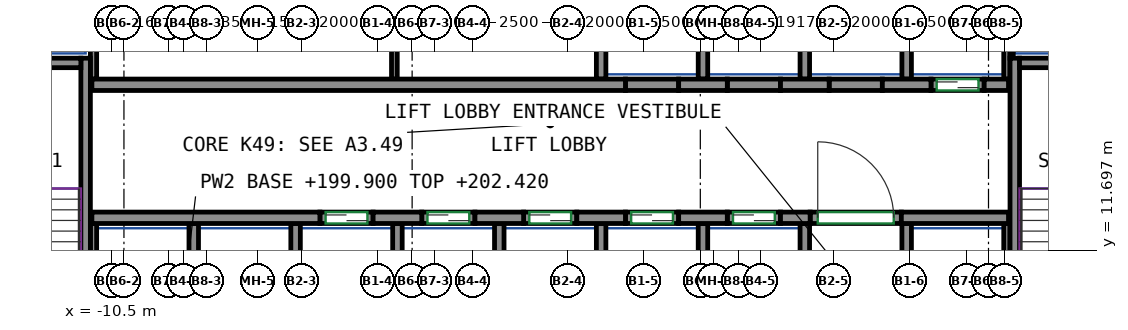
"""IFC4 building model, lengths in metres.
Left out: names, types, materials, properties, quantities, classifications, styles, units other than length and angle.
Written with IfcOpenShell. Run it as: python <this file> out.ifc"""

import sys

from ifc_helpers import new_model, si_unit, direction, frame, frame_2d, origin, place, context, subcontext, project, spatial, rectangle, extrude, source, transform, mapped, element, fill, save


model = new_model("IFC4")
c1 = context("Model", 3, precision=1e-05, world=origin(), true_north=direction((0.0, 1.0)))
c2 = subcontext(c1, "Body", "Model", "MODEL_VIEW")
j1 = project(units=[si_unit("LENGTHUNIT", "METRE"), si_unit("PLANEANGLEUNIT", "RADIAN")], contexts=[c1])
p1 = place(None, origin())
s1 = spatial("IfcSite", under=j1, at=p1, CompositionType="ELEMENT")
p2 = place(p1, origin())
s2 = spatial("IfcBuilding", under=s1, at=p2, CompositionType="ELEMENT")
p3 = place(p2, frame((0.0, 0.0, 199.9)))
s3 = spatial("IfcBuildingStorey", under=s2, at=p3, CompositionType="ELEMENT", Elevation=199.9)
m1 = source(origin(), c2, "Body", "SweptSolid", [
    extrude(rectangle(XDim=7.75, YDim=0.25, at=frame_2d((3.875, 0.0))), origin(), (0.0, 0.0, 1.0), 3.12),
])
p4 = place(p3, frame((-11.175, 9.0, 0.0), z_axis=(0.0, 0.0, 1.0), x_axis=(0.0, 1.0, 0.0)))
e1 = element("IfcWall", 1, at=p4, inside=s3, PredefinedType="SHEAR", context=c2, shape_type="MappedRepresentation", body=[
    mapped(m1, transform((0.0, 0.0, 0.0))),
])
m2 = source(origin(), c2, "Body", "SweptSolid", [
    extrude(rectangle(XDim=3.7, YDim=0.25, at=frame_2d((1.85, 0.0))), origin(), (0.0, 0.0, 1.0), 3.12),
])
p5 = place(p3, frame((-15.0, 16.625, 0.0), z_axis=(0.0, 0.0, 1.0), x_axis=(1.0, 0.0, 0.0)))
e2 = element("IfcWall", 2, at=p5, inside=s3, PredefinedType="SHEAR", context=c2, shape_type="MappedRepresentation", body=[
    mapped(m2, transform((0.0, 0.0, 0.0))),
])
p6 = place(p3, frame((13.275, 9.0, 0.0), z_axis=(0.0, 0.0, 1.0), x_axis=(0.0, 1.0, 0.0)))
e3 = element("IfcWall", 3, at=p6, inside=s3, PredefinedType="SHEAR", context=c2, shape_type="MappedRepresentation", body=[
    mapped(m1, transform((0.0, 0.0, 0.0))),
])
m3 = source(origin(), c2, "Body", "SweptSolid", [
    extrude(rectangle(XDim=3.7, YDim=0.25, at=frame_2d((1.85, 0.0))), origin(), (0.0, 0.0, 1.0), 3.12),
])
p7 = place(p3, frame((13.4, 16.625, 0.0), z_axis=(0.0, 0.0, 1.0), x_axis=(1.0, 0.0, 0.0)))
e4 = element("IfcWall", 4, at=p7, inside=s3, PredefinedType="SHEAR", context=c2, shape_type="MappedRepresentation", body=[
    mapped(m3, transform((0.0, 0.0, 0.0))),
])
m4 = source(origin(), c2, "Body", "SweptSolid", [
    extrude(rectangle(XDim=6.0, YDim=0.3, at=frame_2d((3.0, 0.0))), origin(), (0.0, 0.0, 1.0), 3.12),
])
p8 = place(p3, frame((-11.01, 12.55, 0.0), z_axis=(0.0, 0.0, 1.0), x_axis=(1.0, 0.0, 0.0)))
e5 = element("IfcWall", 5, at=p8, inside=s3, PredefinedType="SHEAR", context=c2, shape_type="MappedRepresentation", body=[
    mapped(m4, transform((0.0, 0.0, 0.0))),
])
m5 = source(origin(), c2, "Body", "SweptSolid", [
    extrude(rectangle(XDim=1.28, YDim=0.3, at=frame_2d((0.64, 0.0))), origin(), (0.0, 0.0, 1.0), 3.12),
])
for number, where, z_axis, x_axis in (
    (6, (-3.61, 12.55, 0.0), (0.0, 0.0, 1.0), (1.0, 0.0, 0.0)),
    (7, (-0.93, 12.55, 0.0), (0.0, 0.0, 1.0), (1.0, 0.0, 0.0)),
    (8, (1.75, 12.55, 0.0), (0.0, 0.0, 1.0), (1.0, 0.0, 0.0)),
    (9, (4.43, 12.55, 0.0), (0.0, 0.0, 1.0), (1.0, 0.0, 0.0)),
):
    element("IfcWall", number, at=place(p3, frame(where, z_axis=z_axis, x_axis=x_axis)), inside=s3, PredefinedType="SHEAR", context=c2, shape_type="MappedRepresentation", body=[
        mapped(m5, transform((0.0, 0.0, 0.0))),
    ])
m6 = source(origin(), c2, "Body", "SweptSolid", [
    extrude(rectangle(XDim=0.78, YDim=0.3, at=frame_2d((0.39, 0.0))), origin(), (0.0, 0.0, 1.0), 3.12),
])
p9 = place(p3, frame((7.11, 12.55, 0.0), z_axis=(0.0, 0.0, 1.0), x_axis=(1.0, 0.0, 0.0)))
e10 = element("IfcWall", 10, at=p9, inside=s3, PredefinedType="SHEAR", context=c2, shape_type="MappedRepresentation", body=[
    mapped(m6, transform((0.0, 0.0, 0.0))),
])
m7 = source(origin(), c2, "Body", "SweptSolid", [
    extrude(rectangle(XDim=2.82, YDim=0.3, at=frame_2d((1.41, 0.0))), origin(), (0.0, 0.0, 1.0), 3.12),
])
p10 = place(p3, frame((10.29, 12.55, 0.0), z_axis=(0.0, 0.0, 1.0), x_axis=(1.0, 0.0, 0.0)))
e11 = element("IfcWall", 11, at=p10, inside=s3, PredefinedType="SHEAR", context=c2, shape_type="MappedRepresentation", body=[
    mapped(m7, transform((0.0, 0.0, 0.0))),
])
m8 = source(origin(), c2, "Body", "SweptSolid", [
    extrude(rectangle(XDim=14.04, YDim=0.3, at=frame_2d((7.02, 0.0))), origin(), (0.0, 0.0, 1.0), 3.12),
])
p11 = place(p3, frame((-11.01, 16.05, 0.0), z_axis=(0.0, 0.0, 1.0), x_axis=(1.0, 0.0, 0.0)))
e12 = element("IfcWall", 12, at=p11, inside=s3, PredefinedType="SHEAR", context=c2, shape_type="MappedRepresentation", body=[
    mapped(m8, transform((0.0, 0.0, 0.0))),
])
p12 = place(p3, frame((4.43, 16.05, 0.0), z_axis=(0.0, 0.0, 1.0), x_axis=(1.0, 0.0, 0.0)))
e13 = element("IfcWall", 13, at=p12, inside=s3, PredefinedType="SHEAR", context=c2, shape_type="MappedRepresentation", body=[
    mapped(m5, transform((0.0, 0.0, 0.0))),
])
m9 = source(origin(), c2, "Body", "SweptSolid", [
    extrude(rectangle(XDim=1.28, YDim=0.3, at=frame_2d((0.64, 0.0))), origin(), (0.0, 0.0, 1.0), 3.12),
])
p13 = place(p3, frame((7.11, 16.05, 0.0), z_axis=(0.0, 0.0, 1.0), x_axis=(1.0, 0.0, 0.0)))
e14 = element("IfcWall", 14, at=p13, inside=s3, PredefinedType="SHEAR", context=c2, shape_type="MappedRepresentation", body=[
    mapped(m9, transform((0.0, 0.0, 0.0))),
])
p14 = place(p3, frame((9.79, 16.05, 0.0), z_axis=(0.0, 0.0, 1.0), x_axis=(1.0, 0.0, 0.0)))
e15 = element("IfcWall", 15, at=p14, inside=s3, PredefinedType="SHEAR", context=c2, shape_type="MappedRepresentation", body=[
    mapped(m5, transform((0.0, 0.0, 0.0))),
])
m10 = source(origin(), c2, "Body", "SweptSolid", [
    extrude(rectangle(XDim=0.64, YDim=0.3, at=frame_2d((0.32, 0.0))), origin(), (0.0, 0.0, 1.0), 3.12),
])
p15 = place(p3, frame((12.47, 16.05, 0.0), z_axis=(0.0, 0.0, 1.0), x_axis=(1.0, 0.0, 0.0)))
e16 = element("IfcWall", 16, at=p15, inside=s3, PredefinedType="SHEAR", context=c2, shape_type="MappedRepresentation", body=[
    mapped(m10, transform((0.0, 0.0, 0.0))),
])
m11 = source(origin(), c2, "Body", "SweptSolid", [
    extrude(rectangle(XDim=1.4, YDim=0.3, at=frame_2d((0.7, 0.0))), origin(), (0.0, 0.0, 1.0), 3.12),
])
p16 = place(p3, frame((-5.01, 12.55, 0.0), z_axis=(0.0, 0.0, 1.0), x_axis=(1.0, 0.0, 0.0)))
e17 = element("IfcWall", 17, at=p16, inside=s3, PredefinedType="PARTITIONING", context=c2, shape_type="MappedRepresentation", body=[
    mapped(m11, transform((0.0, 0.0, 0.0))),
])
p17 = place(p16, frame((0.15, 0.0, 0.0)))
e18 = element("IfcOpeningElement", 18, at=p17, cuts=e17, PredefinedType="OPENING", context=c2, shape_type="SweptSolid", body=[
    extrude(rectangle(XDim=1.1, YDim=2.1, at=frame_2d((0.55, 1.05))), frame((0.0, 0.16, 0.0), z_axis=(0.0, -1.0, 0.0), x_axis=(1.0, 0.0, 0.0)), (0.0, 0.0, 1.0), 0.32),
])
m12 = source(origin(), c2, "Body", "SweptSolid", [
    extrude(rectangle(XDim=1.4, YDim=0.3, at=frame_2d((0.7, 0.0))), origin(), (0.0, 0.0, 1.0), 3.12),
])
p18 = place(p3, frame((-2.33, 12.55, 0.0), z_axis=(0.0, 0.0, 1.0), x_axis=(1.0, 0.0, 0.0)))
e19 = element("IfcWall", 19, at=p18, inside=s3, PredefinedType="PARTITIONING", context=c2, shape_type="MappedRepresentation", body=[
    mapped(m12, transform((0.0, 0.0, 0.0))),
])
p19 = place(p18, frame((0.15, 0.0, 0.0)))
e20 = element("IfcOpeningElement", 20, at=p19, cuts=e19, PredefinedType="OPENING", context=c2, shape_type="SweptSolid", body=[
    extrude(rectangle(XDim=1.1, YDim=2.1, at=frame_2d((0.55, 1.05))), frame((0.0, 0.16, 0.0), z_axis=(0.0, -1.0, 0.0), x_axis=(1.0, 0.0, 0.0)), (0.0, 0.0, 1.0), 0.32),
])
p20 = place(p3, frame((0.35, 12.55, 0.0), z_axis=(0.0, 0.0, 1.0), x_axis=(1.0, 0.0, 0.0)))
e21 = element("IfcWall", 21, at=p20, inside=s3, PredefinedType="PARTITIONING", context=c2, shape_type="MappedRepresentation", body=[
    mapped(m11, transform((0.0, 0.0, 0.0))),
])
p21 = place(p20, frame((0.15, 0.0, 0.0)))
e22 = element("IfcOpeningElement", 22, at=p21, cuts=e21, PredefinedType="OPENING", context=c2, shape_type="SweptSolid", body=[
    extrude(rectangle(XDim=1.1, YDim=2.1, at=frame_2d((0.55, 1.05))), frame((0.0, 0.16, 0.0), z_axis=(0.0, -1.0, 0.0), x_axis=(1.0, 0.0, 0.0)), (0.0, 0.0, 1.0), 0.32),
])
p22 = place(p3, frame((3.03, 12.55, 0.0), z_axis=(0.0, 0.0, 1.0), x_axis=(1.0, 0.0, 0.0)))
e23 = element("IfcWall", 23, at=p22, inside=s3, PredefinedType="PARTITIONING", context=c2, shape_type="MappedRepresentation", body=[
    mapped(m11, transform((0.0, 0.0, 0.0))),
])
p23 = place(p22, frame((0.15, 0.0, 0.0)))
e24 = element("IfcOpeningElement", 24, at=p23, cuts=e23, PredefinedType="OPENING", context=c2, shape_type="SweptSolid", body=[
    extrude(rectangle(XDim=1.1, YDim=2.1, at=frame_2d((0.55, 1.05))), frame((0.0, 0.16, 0.0), z_axis=(0.0, -1.0, 0.0), x_axis=(1.0, 0.0, 0.0)), (0.0, 0.0, 1.0), 0.32),
])
p24 = place(p3, frame((5.71, 12.55, 0.0), z_axis=(0.0, 0.0, 1.0), x_axis=(1.0, 0.0, 0.0)))
e25 = element("IfcWall", 25, at=p24, inside=s3, PredefinedType="PARTITIONING", context=c2, shape_type="MappedRepresentation", body=[
    mapped(m12, transform((0.0, 0.0, 0.0))),
])
p25 = place(p24, frame((0.15, 0.0, 0.0)))
e26 = element("IfcOpeningElement", 26, at=p25, cuts=e25, PredefinedType="OPENING", context=c2, shape_type="SweptSolid", body=[
    extrude(rectangle(XDim=1.1, YDim=2.1, at=frame_2d((0.55, 1.05))), frame((0.0, 0.16, 0.0), z_axis=(0.0, -1.0, 0.0), x_axis=(1.0, 0.0, 0.0)), (0.0, 0.0, 1.0), 0.32),
])
p26 = place(p3, frame((11.07, 16.05, 0.0), z_axis=(0.0, 0.0, 1.0), x_axis=(1.0, 0.0, 0.0)))
e27 = element("IfcWall", 27, at=p26, inside=s3, PredefinedType="PARTITIONING", context=c2, shape_type="MappedRepresentation", body=[
    mapped(m11, transform((0.0, 0.0, 0.0))),
])
p27 = place(p26, frame((0.15, 0.0, 0.0)))
e28 = element("IfcOpeningElement", 28, at=p27, cuts=e27, PredefinedType="OPENING", context=c2, shape_type="SweptSolid", body=[
    extrude(rectangle(XDim=1.1, YDim=2.1, at=frame_2d((0.55, 1.05))), frame((0.0, 0.16, 0.0), z_axis=(0.0, -1.0, 0.0), x_axis=(1.0, 0.0, 0.0)), (0.0, 0.0, 1.0), 0.32),
])
m13 = source(origin(), c2, "Body", "SweptSolid", [
    extrude(rectangle(XDim=2.4, YDim=0.3, at=frame_2d((1.2, 0.0))), origin(), (0.0, 0.0, 1.0), 3.12),
])
p28 = place(p3, frame((7.89, 12.55, 0.0), z_axis=(0.0, 0.0, 1.0), x_axis=(1.0, 0.0, 0.0)))
e29 = element("IfcWall", 29, at=p28, inside=s3, PredefinedType="PARTITIONING", context=c2, shape_type="MappedRepresentation", body=[
    mapped(m13, transform((0.0, 0.0, 0.0))),
])
p29 = place(p28, frame((0.2, 0.0, 0.0)))
e30 = element("IfcOpeningElement", 30, at=p29, cuts=e29, PredefinedType="OPENING", context=c2, shape_type="SweptSolid", body=[
    extrude(rectangle(XDim=2.0, YDim=2.1, at=frame_2d((1.0, 1.05))), frame((0.0, 0.16, 0.0), z_axis=(0.0, -1.0, 0.0), x_axis=(1.0, 0.0, 0.0)), (0.0, 0.0, 1.0), 0.32),
])
p30 = place(p3, frame((3.03, 16.05, 0.0), z_axis=(0.0, 0.0, 1.0), x_axis=(1.0, 0.0, 0.0)))
e31 = element("IfcWall", 31, at=p30, inside=s3, PredefinedType="PARTITIONING", context=c2, shape_type="MappedRepresentation", body=[
    mapped(m11, transform((0.0, 0.0, 0.0))),
])
for number, where, z_axis, x_axis in (
    (32, (5.71, 16.05, 0.0), (0.0, 0.0, 1.0), (1.0, 0.0, 0.0)),
    (33, (8.39, 16.05, 0.0), (0.0, 0.0, 1.0), (1.0, 0.0, 0.0)),
):
    element("IfcWall", number, at=place(p3, frame(where, z_axis=z_axis, x_axis=x_axis)), inside=s3, PredefinedType="PARTITIONING", context=c2, shape_type="MappedRepresentation", body=[
        mapped(m12, transform((0.0, 0.0, 0.0))),
    ])
m14 = source(origin(), c2, "Body", "SweptSolid", [
    extrude(rectangle(XDim=3.275, YDim=0.165, at=frame_2d((1.638, 0.0))), origin(), (0.0, 0.0, 1.0), 3.12),
])
p31 = place(p3, frame((13.067, 16.2, 0.0), z_axis=(0.0, 0.0, 1.0), x_axis=(0.0, 1.0, 0.0)))
e34 = element("IfcWall", 34, at=p31, inside=s3, PredefinedType="PARTITIONING", context=c2, shape_type="MappedRepresentation", body=[
    mapped(m14, transform((0.0, 0.0, 0.0))),
])
m15 = source(origin(), c2, "Body", "SweptSolid", [
    extrude(rectangle(XDim=4.8, YDim=0.165, at=frame_2d((2.4, 0.0))), origin(), (0.0, 0.0, 1.0), 3.12),
])
p32 = place(p3, frame((-10.968, 16.2, 0.0), z_axis=(0.0, 0.0, 1.0), x_axis=(0.0, 1.0, 0.0)))
e35 = element("IfcWall", 35, at=p32, inside=s3, PredefinedType="PARTITIONING", context=c2, shape_type="MappedRepresentation", body=[
    mapped(m15, transform((0.0, 0.0, 0.0))),
])
m16 = source(origin(), c2, "Body", "SweptSolid", [
    extrude(rectangle(XDim=3.275, YDim=0.25, at=frame_2d((1.638, 0.0))), origin(), (0.0, 0.0, 1.0), 3.12),
])
p33 = place(p3, frame((10.43, 16.2, 0.0), z_axis=(0.0, 0.0, 1.0), x_axis=(0.0, 1.0, 0.0)))
e36 = element("IfcWall", 36, at=p33, inside=s3, PredefinedType="PARTITIONING", context=c2, shape_type="MappedRepresentation", body=[
    mapped(m16, transform((0.0, 0.0, 0.0))),
])
m17 = source(origin(), c2, "Body", "SweptSolid", [
    extrude(rectangle(XDim=2.725, YDim=0.085, at=frame_2d((1.363, 0.0))), origin(), (0.0, 0.0, 1.0), 3.12),
])
p34 = place(p3, frame((13.192, 16.75, 0.0), z_axis=(0.0, 0.0, 1.0), x_axis=(0.0, 1.0, 0.0)))
e37 = element("IfcWall", 37, at=p34, inside=s3, PredefinedType="PARTITIONING", context=c2, shape_type="MappedRepresentation", body=[
    mapped(m17, transform((0.0, 0.0, 0.0))),
])
for number, where, z_axis, x_axis in (
    (38, (2.39, 16.2, 0.0), (0.0, 0.0, 1.0), (0.0, 1.0, 0.0)),
    (39, (5.07, 16.2, 0.0), (0.0, 0.0, 1.0), (0.0, 1.0, 0.0)),
    (40, (7.75, 16.2, 0.0), (0.0, 0.0, 1.0), (0.0, 1.0, 0.0)),
):
    element("IfcWall", number, at=place(p3, frame(where, z_axis=z_axis, x_axis=x_axis)), inside=s3, PredefinedType="PARTITIONING", context=c2, shape_type="MappedRepresentation", body=[
        mapped(m16, transform((0.0, 0.0, 0.0))),
    ])
m18 = source(origin(), c2, "Body", "SweptSolid", [
    extrude(rectangle(XDim=3.4, YDim=0.25, at=frame_2d((1.7, 0.0))), origin(), (0.0, 0.0, 1.0), 3.12),
])
p35 = place(p3, frame((10.43, 9.0, 0.0), z_axis=(0.0, 0.0, 1.0), x_axis=(0.0, 1.0, 0.0)))
e41 = element("IfcWall", 41, at=p35, inside=s3, PredefinedType="PARTITIONING", context=c2, shape_type="MappedRepresentation", body=[
    mapped(m18, transform((0.0, 0.0, 0.0))),
])
m19 = source(origin(), c2, "Body", "SweptSolid", [
    extrude(rectangle(XDim=3.4, YDim=0.165, at=frame_2d((1.7, 0.0))), origin(), (0.0, 0.0, 1.0), 3.12),
])
p36 = place(p3, frame((13.067, 9.0, 0.0), z_axis=(0.0, 0.0, 1.0), x_axis=(0.0, 1.0, 0.0)))
e42 = element("IfcWall", 42, at=p36, inside=s3, PredefinedType="PARTITIONING", context=c2, shape_type="MappedRepresentation", body=[
    mapped(m19, transform((0.0, 0.0, 0.0))),
])
for number, where, z_axis, x_axis in (
    (43, (2.39, 9.0, 0.0), (0.0, 0.0, 1.0), (0.0, 1.0, 0.0)),
    (44, (5.07, 9.0, 0.0), (0.0, 0.0, 1.0), (0.0, 1.0, 0.0)),
    (45, (7.75, 9.0, 0.0), (0.0, 0.0, 1.0), (0.0, 1.0, 0.0)),
    (46, (-0.29, 9.0, 0.0), (0.0, 0.0, 1.0), (0.0, 1.0, 0.0)),
):
    element("IfcWall", number, at=place(p3, frame(where, z_axis=z_axis, x_axis=x_axis)), inside=s3, PredefinedType="PARTITIONING", context=c2, shape_type="MappedRepresentation", body=[
        mapped(m18, transform((0.0, 0.0, 0.0))),
    ])
p37 = place(p3, frame((-10.968, 9.0, 0.0), z_axis=(0.0, 0.0, 1.0), x_axis=(0.0, 1.0, 0.0)))
e47 = element("IfcWall", 47, at=p37, inside=s3, PredefinedType="PARTITIONING", context=c2, shape_type="MappedRepresentation", body=[
    mapped(m19, transform((0.0, 0.0, 0.0))),
])
for number, where, z_axis, x_axis in (
    (48, (-2.97, 9.0, 0.0), (0.0, 0.0, 1.0), (0.0, 1.0, 0.0)),
    (49, (-5.65, 9.0, 0.0), (0.0, 0.0, 1.0), (0.0, 1.0, 0.0)),
    (50, (-8.33, 9.0, 0.0), (0.0, 0.0, 1.0), (0.0, 1.0, 0.0)),
):
    element("IfcWall", number, at=place(p3, frame(where, z_axis=z_axis, x_axis=x_axis)), inside=s3, PredefinedType="PARTITIONING", context=c2, shape_type="MappedRepresentation", body=[
        mapped(m18, transform((0.0, 0.0, 0.0))),
    ])
m20 = source(origin(), c2, "Body", "SweptSolid", [
    extrude(rectangle(XDim=4.8, YDim=0.15, at=frame_2d((2.4, 0.0))), origin(), (0.0, 0.0, 1.0), 3.12),
])
p38 = place(p3, frame((-3.05, 16.2, 0.0), z_axis=(0.0, 0.0, 1.0), x_axis=(0.0, 1.0, 0.0)))
e51 = element("IfcWall", 51, at=p38, inside=s3, PredefinedType="PARTITIONING", context=c2, shape_type="MappedRepresentation", body=[
    mapped(m20, transform((0.0, 0.0, 0.0))),
])
p39 = place(p29, origin())
e52 = element("IfcDoor", 52, at=p39, inside=s3, OperationType="DOUBLE_DOOR_SINGLE_SWING", PredefinedType="DOOR", context=c2, shape_type="SweptSolid", body=[
    extrude(rectangle(XDim=2.0, YDim=2.1, at=frame_2d((1.0, 1.05))), frame((0.0, 0.025, 0.0), z_axis=(0.0, -1.0, 0.0), x_axis=(1.0, 0.0, 0.0)), (0.0, 0.0, 1.0), 0.05),
])
fill(e30, e52)
p40 = place(p17, origin())
e53 = element("IfcDoor", 53, at=p40, inside=s3, OperationType="DOUBLE_DOOR_SLIDING", PredefinedType="DOOR", context=c2, shape_type="SweptSolid", body=[
    extrude(rectangle(XDim=1.1, YDim=2.1, at=frame_2d((0.55, 1.05))), frame((0.0, 0.025, 0.0), z_axis=(0.0, -1.0, 0.0), x_axis=(1.0, 0.0, 0.0)), (0.0, 0.0, 1.0), 0.05),
])
fill(e18, e53)
p41 = place(p19, origin())
e54 = element("IfcDoor", 54, at=p41, inside=s3, OperationType="DOUBLE_DOOR_SLIDING", PredefinedType="DOOR", context=c2, shape_type="SweptSolid", body=[
    extrude(rectangle(XDim=1.1, YDim=2.1, at=frame_2d((0.55, 1.05))), frame((0.0, 0.025, 0.0), z_axis=(0.0, -1.0, 0.0), x_axis=(1.0, 0.0, 0.0)), (0.0, 0.0, 1.0), 0.05),
])
fill(e20, e54)
p42 = place(p21, origin())
e55 = element("IfcDoor", 55, at=p42, inside=s3, OperationType="DOUBLE_DOOR_SLIDING", PredefinedType="DOOR", context=c2, shape_type="SweptSolid", body=[
    extrude(rectangle(XDim=1.1, YDim=2.1, at=frame_2d((0.55, 1.05))), frame((0.0, 0.025, 0.0), z_axis=(0.0, -1.0, 0.0), x_axis=(1.0, 0.0, 0.0)), (0.0, 0.0, 1.0), 0.05),
])
fill(e22, e55)
p43 = place(p23, origin())
e56 = element("IfcDoor", 56, at=p43, inside=s3, OperationType="DOUBLE_DOOR_SLIDING", PredefinedType="DOOR", context=c2, shape_type="SweptSolid", body=[
    extrude(rectangle(XDim=1.1, YDim=2.1, at=frame_2d((0.55, 1.05))), frame((0.0, 0.025, 0.0), z_axis=(0.0, -1.0, 0.0), x_axis=(1.0, 0.0, 0.0)), (0.0, 0.0, 1.0), 0.05),
])
fill(e24, e56)
p44 = place(p25, origin())
e57 = element("IfcDoor", 57, at=p44, inside=s3, OperationType="DOUBLE_DOOR_SLIDING", PredefinedType="DOOR", context=c2, shape_type="SweptSolid", body=[
    extrude(rectangle(XDim=1.1, YDim=2.1, at=frame_2d((0.55, 1.05))), frame((0.0, 0.025, 0.0), z_axis=(0.0, -1.0, 0.0), x_axis=(1.0, 0.0, 0.0)), (0.0, 0.0, 1.0), 0.05),
])
fill(e26, e57)
p45 = place(p27, origin())
e58 = element("IfcDoor", 58, at=p45, inside=s3, OperationType="DOUBLE_DOOR_SLIDING", PredefinedType="DOOR", context=c2, shape_type="SweptSolid", body=[
    extrude(rectangle(XDim=1.1, YDim=2.1, at=frame_2d((0.55, 1.05))), frame((0.0, 0.025, 0.0), z_axis=(0.0, -1.0, 0.0), x_axis=(1.0, 0.0, 0.0)), (0.0, 0.0, 1.0), 0.05),
])
fill(e28, e58)
save(model, sys.argv[1])
